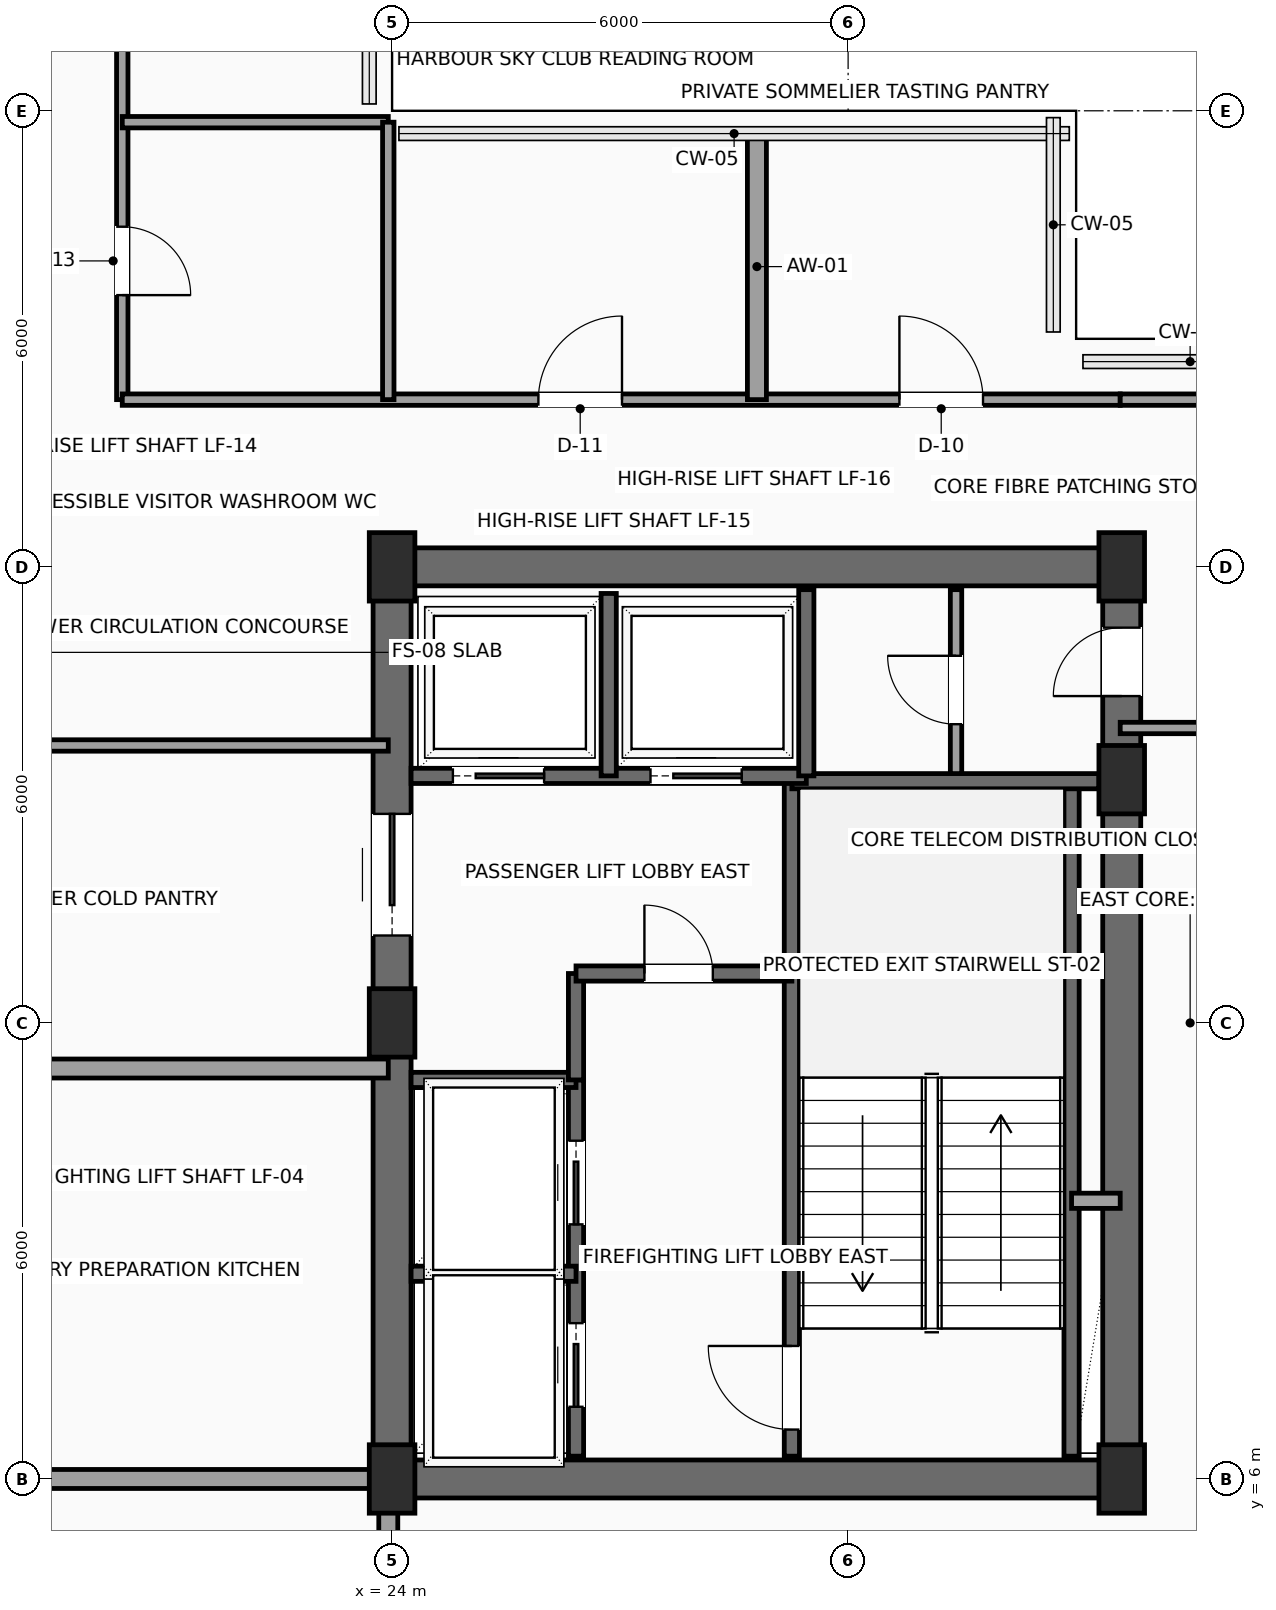
"""IFC4 building model, lengths in metres.
Left out: names, types, materials, properties, quantities, classifications, styles, units other than length and angle.
Written with IfcOpenShell. Run it as: python <this file> out.ifc"""

import sys

from ifc_helpers import new_model, si_unit, direction, frame, frame_2d, origin, origin_2d, place, context, subcontext, project, spatial, rectangle, extrude, element, fill, save


model = new_model("IFC4")
c1 = context("Model", 3, precision=1e-05, world=origin(), true_north=direction((0.0, 1.0)))
c2 = subcontext(c1, "Body", "Model", "MODEL_VIEW")
j1 = project(units=[si_unit("LENGTHUNIT", "METRE"), si_unit("PLANEANGLEUNIT", "RADIAN")], contexts=[c1])
p1 = place(None, origin())
s1 = spatial("IfcSite", under=j1, at=p1, CompositionType="ELEMENT")
p2 = place(p1, origin())
s2 = spatial("IfcBuilding", under=s1, at=p2, CompositionType="ELEMENT")
p3 = place(p2, frame((0.0, 0.0, 288.7)))
s3 = spatial("IfcBuildingStorey", under=s2, at=p3, CompositionType="ELEMENT", Elevation=288.7)
for number, where, z_axis, x_axis in (
    (1, (24.0, 6.0, 0.0), (0.0, 0.0, 1.0), (1.0, 0.0, 0.0)),
    (2, (24.0, 12.0, 0.0), (0.0, 0.0, 1.0), (1.0, 0.0, 0.0)),
    (3, (24.0, 18.0, 0.0), (0.0, 0.0, 1.0), (1.0, 0.0, 0.0)),
    (4, (33.6, 6.0, 0.0), (0.0, 0.0, 1.0), (1.0, 0.0, 0.0)),
    (5, (33.6, 15.2, 0.0), (0.0, 0.0, 1.0), (1.0, 0.0, 0.0)),
    (6, (33.6, 18.0, 0.0), (0.0, 0.0, 1.0), (1.0, 0.0, 0.0)),
):
    element("IfcColumn", number, at=place(p3, frame(where, z_axis=z_axis, x_axis=x_axis)), inside=s3, PredefinedType="COLUMN", context=c2, shape_type="SweptSolid", body=[
        extrude(rectangle(XDim=0.6, YDim=0.9, at=origin_2d()), origin(), (0.0, 0.0, 1.0), 3.5),
    ])
for number, where, z_axis, x_axis in (
    (7, (24.0, 6.0, 0.0), (0.0, 0.0, 1.0), (1.0, 0.0, 0.0)),
    (8, (24.0, 18.0, 0.0), (0.0, 0.0, 1.0), (1.0, 0.0, 0.0)),
):
    element("IfcWall", number, at=place(p3, frame(where, z_axis=z_axis, x_axis=x_axis)), inside=s3, PredefinedType="SHEAR", context=c2, shape_type="SweptSolid", body=[
        extrude(rectangle(XDim=9.6, YDim=0.5, at=frame_2d((4.8, 0.0))), origin(), (0.0, 0.0, 1.0), 3.3),
    ])
p4 = place(p3, frame((24.0, 6.0, 0.0), z_axis=(0.0, 0.0, 1.0), x_axis=(0.0, 1.0, 0.0)))
e9 = element("IfcWall", 9, at=p4, inside=s3, PredefinedType="SHEAR", context=c2, shape_type="SweptSolid", body=[
    extrude(rectangle(XDim=12.0, YDim=0.5, at=frame_2d((6.0, 0.0))), origin(), (0.0, 0.0, 1.0), 3.3),
])
p5 = place(p4, frame((7.15, 0.0, 0.0)))
e10 = element("IfcOpeningElement", 10, at=p5, cuts=e9, PredefinedType="OPENING", context=c2, shape_type="SweptSolid", body=[
    extrude(rectangle(XDim=1.6, YDim=2.3, at=frame_2d((0.8, 1.15))), frame((0.0, 0.26, 0.0), z_axis=(0.0, -1.0, 0.0), x_axis=(1.0, 0.0, 0.0)), (0.0, 0.0, 1.0), 0.52),
])
p6 = place(p3, frame((33.6, 6.0, 0.0), z_axis=(0.0, 0.0, 1.0), x_axis=(0.0, 1.0, 0.0)))
e11 = element("IfcWall", 11, at=p6, inside=s3, PredefinedType="SHEAR", context=c2, shape_type="SweptSolid", body=[
    extrude(rectangle(XDim=12.0, YDim=0.5, at=frame_2d((6.0, 0.0))), origin(), (0.0, 0.0, 1.0), 3.3),
])
p7 = place(p6, frame((10.3, 0.0, 0.0)))
e12 = element("IfcOpeningElement", 12, at=p7, cuts=e11, PredefinedType="OPENING", context=c2, shape_type="SweptSolid", body=[
    extrude(rectangle(XDim=0.9, YDim=2.15, at=frame_2d((0.45, 1.075))), frame((0.0, 0.26, 0.0), z_axis=(0.0, -1.0, 0.0), x_axis=(1.0, 0.0, 0.0)), (0.0, 0.0, 1.0), 0.52),
])
p8 = place(p3, frame((29.26, 6.3, 0.0), z_axis=(0.0, 0.0, 1.0), x_axis=(0.0, 1.0, 0.0)))
e13 = element("IfcWall", 13, at=p8, inside=s3, PredefinedType="SHEAR", context=c2, shape_type="SweptSolid", body=[
    extrude(rectangle(XDim=8.88, YDim=0.2, at=frame_2d((4.44, 0.0))), origin(), (0.0, 0.0, 1.0), 3.3),
])
p9 = place(p8, frame((0.35, 0.0, 0.0)))
e14 = element("IfcOpeningElement", 14, at=p9, cuts=e13, PredefinedType="OPENING", context=c2, shape_type="SweptSolid", body=[
    extrude(rectangle(XDim=1.1, YDim=2.2, at=frame_2d((0.55, 1.1))), frame((0.0, 0.11, 0.0), z_axis=(0.0, -1.0, 0.0), x_axis=(1.0, 0.0, 0.0)), (0.0, 0.0, 1.0), 0.22),
])
p10 = place(p3, frame((32.94, 6.3, 0.0), z_axis=(0.0, 0.0, 1.0), x_axis=(0.0, 1.0, 0.0)))
e15 = element("IfcWall", 15, at=p10, inside=s3, PredefinedType="SHEAR", context=c2, shape_type="SweptSolid", body=[
    extrude(rectangle(XDim=8.88, YDim=0.2, at=frame_2d((4.44, 0.0))), origin(), (0.0, 0.0, 1.0), 3.3),
])
p11 = place(p3, frame((29.26, 15.18, 0.0), z_axis=(0.0, 0.0, 1.0), x_axis=(1.0, 0.0, 0.0)))
e16 = element("IfcWall", 16, at=p11, inside=s3, PredefinedType="SHEAR", context=c2, shape_type="SweptSolid", body=[
    extrude(rectangle(XDim=4.04, YDim=0.2, at=frame_2d((2.02, 0.0))), origin(), (0.0, 0.0, 1.0), 3.3),
])
p12 = place(p3, frame((26.42, 6.3, 0.0), z_axis=(0.0, 0.0, 1.0), x_axis=(0.0, 1.0, 0.0)))
e17 = element("IfcWall", 17, at=p12, inside=s3, PredefinedType="SHEAR", context=c2, shape_type="SweptSolid", body=[
    extrude(rectangle(XDim=4.95, YDim=0.2, at=frame_2d((2.475, 0.0))), origin(), (0.0, 0.0, 1.0), 3.3),
])
p13 = place(p12, frame((0.65, 0.0, 0.0)))
e18 = element("IfcOpeningElement", 18, at=p13, cuts=e17, PredefinedType="OPENING", context=c2, shape_type="SweptSolid", body=[
    extrude(rectangle(XDim=1.1, YDim=2.2, at=frame_2d((0.55, 1.1))), frame((0.0, 0.11, 0.0), z_axis=(0.0, -1.0, 0.0), x_axis=(1.0, 0.0, 0.0)), (0.0, 0.0, 1.0), 0.22),
])
p14 = place(p12, frame((3.05, 0.0, 0.0)))
e19 = element("IfcOpeningElement", 19, at=p14, cuts=e17, PredefinedType="OPENING", context=c2, shape_type="SweptSolid", body=[
    extrude(rectangle(XDim=1.1, YDim=2.2, at=frame_2d((0.55, 1.1))), frame((0.0, 0.11, 0.0), z_axis=(0.0, -1.0, 0.0), x_axis=(1.0, 0.0, 0.0)), (0.0, 0.0, 1.0), 0.22),
])
for number, where, z_axis, x_axis in (
    (20, (24.25, 8.7, 0.0), (0.0, 0.0, 1.0), (1.0, 0.0, 0.0)),
    (21, (24.25, 11.25, 0.0), (0.0, 0.0, 1.0), (1.0, 0.0, 0.0)),
):
    element("IfcWall", number, at=place(p3, frame(where, z_axis=z_axis, x_axis=x_axis)), inside=s3, PredefinedType="SHEAR", context=c2, shape_type="SweptSolid", body=[
        extrude(rectangle(XDim=2.17, YDim=0.2, at=frame_2d((1.085, 0.0))), origin(), (0.0, 0.0, 1.0), 3.3),
    ])
p15 = place(p3, frame((26.42, 11.25, 0.0), z_axis=(0.0, 0.0, 1.0), x_axis=(0.0, 1.0, 0.0)))
e22 = element("IfcWall", 22, at=p15, inside=s3, PredefinedType="SHEAR", context=c2, shape_type="SweptSolid", body=[
    extrude(rectangle(XDim=1.4, YDim=0.2, at=frame_2d((0.7, 0.0))), origin(), (0.0, 0.0, 1.0), 3.3),
])
p16 = place(p3, frame((26.42, 12.65, 0.0), z_axis=(0.0, 0.0, 1.0), x_axis=(1.0, 0.0, 0.0)))
e23 = element("IfcWall", 23, at=p16, inside=s3, PredefinedType="SHEAR", context=c2, shape_type="SweptSolid", body=[
    extrude(rectangle(XDim=2.84, YDim=0.2, at=frame_2d((1.42, 0.0))), origin(), (0.0, 0.0, 1.0), 3.3),
])
p17 = place(p16, frame((0.9, 0.0, 0.0)))
e24 = element("IfcOpeningElement", 24, at=p17, cuts=e23, PredefinedType="OPENING", context=c2, shape_type="SweptSolid", body=[
    extrude(rectangle(XDim=0.9, YDim=2.15, at=frame_2d((0.45, 1.075))), frame((0.0, 0.11, 0.0), z_axis=(0.0, -1.0, 0.0), x_axis=(1.0, 0.0, 0.0)), (0.0, 0.0, 1.0), 0.22),
])
p18 = place(p3, frame((32.94, 9.66, 0.0), z_axis=(0.0, 0.0, 1.0), x_axis=(1.0, 0.0, 0.0)))
e25 = element("IfcWall", 25, at=p18, inside=s3, PredefinedType="SOLIDWALL", context=c2, shape_type="SweptSolid", body=[
    extrude(rectangle(XDim=0.64, YDim=0.2, at=frame_2d((0.32, 0.0))), origin(), (0.0, 0.0, 1.0), 3.3),
])
p19 = place(p3, frame((24.25, 15.25, 0.0), z_axis=(0.0, 0.0, 1.0), x_axis=(1.0, 0.0, 0.0)))
e26 = element("IfcWall", 26, at=p19, inside=s3, PredefinedType="SHEAR", context=c2, shape_type="SweptSolid", body=[
    extrude(rectangle(XDim=5.2, YDim=0.2, at=frame_2d((2.6, 0.0))), origin(), (0.0, 0.0, 1.0), 3.3),
])
p20 = place(p19, frame((0.55, 0.0, 0.0)))
e27 = element("IfcOpeningElement", 27, at=p20, cuts=e26, PredefinedType="OPENING", context=c2, shape_type="SweptSolid", body=[
    extrude(rectangle(XDim=1.2, YDim=2.2, at=frame_2d((0.6, 1.1))), frame((0.0, 0.11, 0.0), z_axis=(0.0, -1.0, 0.0), x_axis=(1.0, 0.0, 0.0)), (0.0, 0.0, 1.0), 0.22),
])
p21 = place(p19, frame((3.15, 0.0, 0.0)))
e28 = element("IfcOpeningElement", 28, at=p21, cuts=e26, PredefinedType="OPENING", context=c2, shape_type="SweptSolid", body=[
    extrude(rectangle(XDim=1.2, YDim=2.2, at=frame_2d((0.6, 1.1))), frame((0.0, 0.11, 0.0), z_axis=(0.0, -1.0, 0.0), x_axis=(1.0, 0.0, 0.0)), (0.0, 0.0, 1.0), 0.22),
])
p22 = place(p3, frame((26.85, 15.25, 0.0), z_axis=(0.0, 0.0, 1.0), x_axis=(0.0, 1.0, 0.0)))
e29 = element("IfcWall", 29, at=p22, inside=s3, PredefinedType="SHEAR", context=c2, shape_type="SweptSolid", body=[
    extrude(rectangle(XDim=2.4, YDim=0.2, at=frame_2d((1.2, 0.0))), origin(), (0.0, 0.0, 1.0), 3.3),
])
p23 = place(p3, frame((29.45, 15.25, 0.0), z_axis=(0.0, 0.0, 1.0), x_axis=(0.0, 1.0, 0.0)))
e30 = element("IfcWall", 30, at=p23, inside=s3, PredefinedType="SHEAR", context=c2, shape_type="SweptSolid", body=[
    extrude(rectangle(XDim=2.45, YDim=0.2, at=frame_2d((1.225, 0.0))), origin(), (0.0, 0.0, 1.0), 3.3),
])
p24 = place(p3, frame((31.42, 15.28, 0.0), z_axis=(0.0, 0.0, 1.0), x_axis=(0.0, 1.0, 0.0)))
e31 = element("IfcWall", 31, at=p24, inside=s3, PredefinedType="PARTITIONING", context=c2, shape_type="SweptSolid", body=[
    extrude(rectangle(XDim=2.42, YDim=0.15, at=frame_2d((1.21, 0.0))), origin(), (0.0, 0.0, 1.0), 3.3),
])
p25 = place(p24, frame((0.65, 0.0, 0.0)))
e32 = element("IfcOpeningElement", 32, at=p25, cuts=e31, PredefinedType="OPENING", context=c2, shape_type="SweptSolid", body=[
    extrude(rectangle(XDim=0.9, YDim=2.15, at=frame_2d((0.45, 1.075))), frame((0.0, 0.085, 0.0), z_axis=(0.0, -1.0, 0.0), x_axis=(1.0, 0.0, 0.0)), (0.0, 0.0, 1.0), 0.17),
])
p26 = place(p3, frame((20.45, 27.58, 0.0), z_axis=(0.0, 0.0, 1.0), x_axis=(0.0, -1.0, 0.0)))
e33 = element("IfcWall", 33, at=p26, inside=s3, PredefinedType="PARTITIONING", context=c2, shape_type="SweptSolid", body=[
    extrude(rectangle(XDim=7.38, YDim=0.15, at=frame_2d((3.69, 0.0))), origin(), (0.0, 0.0, 1.0), 3.3),
])
p27 = place(p26, frame((5.105, 0.0, 0.0)))
e34 = element("IfcOpeningElement", 34, at=p27, cuts=e33, PredefinedType="OPENING", context=c2, shape_type="SweptSolid", body=[
    extrude(rectangle(XDim=0.9, YDim=2.1, at=frame_2d((0.45, 1.05))), frame((0.0, 0.085, 0.0), z_axis=(0.0, -1.0, 0.0), x_axis=(1.0, 0.0, 0.0)), (0.0, 0.0, 1.0), 0.17),
])
p28 = place(p26, frame((1.405, 0.0, 0.0)))
e35 = element("IfcOpeningElement", 35, at=p28, cuts=e33, PredefinedType="OPENING", context=c2, shape_type="SweptSolid", body=[
    extrude(rectangle(XDim=0.95, YDim=2.15, at=frame_2d((0.475, 1.075))), frame((0.0, 0.085, 0.0), z_axis=(0.0, -1.0, 0.0), x_axis=(1.0, 0.0, 0.0)), (0.0, 0.0, 1.0), 0.17),
])
p29 = place(p3, frame((20.45, 20.2, 0.0), z_axis=(0.0, 0.0, 1.0), x_axis=(1.0, 0.0, 0.0)))
e36 = element("IfcWall", 36, at=p29, inside=s3, PredefinedType="PARTITIONING", context=c2, shape_type="SweptSolid", body=[
    extrude(rectangle(XDim=13.13, YDim=0.15, at=frame_2d((6.565, 0.0))), origin(), (0.0, 0.0, 1.0), 3.3),
])
p30 = place(p29, frame((5.475, 0.0, 0.0)))
e37 = element("IfcOpeningElement", 37, at=p30, cuts=e36, PredefinedType="OPENING", context=c2, shape_type="SweptSolid", body=[
    extrude(rectangle(XDim=1.1, YDim=2.25, at=frame_2d((0.55, 1.125))), frame((0.0, 0.085, 0.0), z_axis=(0.0, -1.0, 0.0), x_axis=(1.0, 0.0, 0.0)), (0.0, 0.0, 1.0), 0.17),
])
p31 = place(p29, frame((10.225, 0.0, 0.0)))
e38 = element("IfcOpeningElement", 38, at=p31, cuts=e36, PredefinedType="OPENING", context=c2, shape_type="SweptSolid", body=[
    extrude(rectangle(XDim=1.1, YDim=2.25, at=frame_2d((0.55, 1.125))), frame((0.0, 0.085, 0.0), z_axis=(0.0, -1.0, 0.0), x_axis=(1.0, 0.0, 0.0)), (0.0, 0.0, 1.0), 0.17),
])
for number, where, z_axis, x_axis in (
    (39, (33.58, 20.2, 0.0), (0.0, 0.0, 1.0), (1.0, 0.0, 0.0)),
    (40, (35.7, 15.88, 0.0), (0.0, 0.0, 1.0), (-1.0, 0.0, 0.0)),
):
    element("IfcWall", number, at=place(p3, frame(where, z_axis=z_axis, x_axis=x_axis)), inside=s3, PredefinedType="PARTITIONING", context=c2, shape_type="SweptSolid", body=[
        extrude(rectangle(XDim=2.12, YDim=0.15, at=frame_2d((1.06, 0.0))), origin(), (0.0, 0.0, 1.0), 3.3),
    ])
p32 = place(p3, frame((23.95, 15.65, 0.0), z_axis=(0.0, 0.0, 1.0), x_axis=(-1.0, 0.0, 0.0)))
e41 = element("IfcWall", 41, at=p32, inside=s3, PredefinedType="PARTITIONING", context=c2, shape_type="SweptSolid", body=[
    extrude(rectangle(XDim=9.0, YDim=0.15, at=frame_2d((4.5, 0.0))), origin(), (0.0, 0.0, 1.0), 3.3),
])
p33 = place(p3, frame((20.45, 23.85, 0.0), z_axis=(0.0, 0.0, 1.0), x_axis=(1.0, 0.0, 0.0)))
e42 = element("IfcWall", 42, at=p33, inside=s3, PredefinedType="PARTITIONING", context=c2, shape_type="SweptSolid", body=[
    extrude(rectangle(XDim=3.5, YDim=0.15, at=frame_2d((1.75, 0.0))), origin(), (0.0, 0.0, 1.0), 3.3),
])
p34 = place(p3, frame((23.95, 20.2, 0.0), z_axis=(0.0, 0.0, 1.0), x_axis=(0.0, 1.0, 0.0)))
e43 = element("IfcWall", 43, at=p34, inside=s3, PredefinedType="PARTITIONING", context=c2, shape_type="SweptSolid", body=[
    extrude(rectangle(XDim=3.65, YDim=0.15, at=frame_2d((1.825, 0.0))), origin(), (0.0, 0.0, 1.0), 3.3),
])
p35 = place(p3, frame((28.8, 20.2, 0.0), z_axis=(0.0, 0.0, 1.0), x_axis=(0.0, 1.0, 0.0)))
e44 = element("IfcWall", 44, at=p35, inside=s3, PredefinedType="PARTITIONING", context=c2, shape_type="SweptSolid", body=[
    extrude(rectangle(XDim=3.5, YDim=0.25, at=frame_2d((1.75, 0.0))), origin(), (0.0, 0.0, 1.0), 3.3),
])
p36 = place(p3, frame((14.95, 6.0, 0.0), z_axis=(0.0, 0.0, 1.0), x_axis=(1.0, 0.0, 0.0)))
e45 = element("IfcWall", 45, at=p36, inside=s3, PredefinedType="PARTITIONING", context=c2, shape_type="SweptSolid", body=[
    extrude(rectangle(XDim=9.0, YDim=0.25, at=frame_2d((4.5, 0.0))), origin(), (0.0, 0.0, 1.0), 2.992),
])
p37 = place(p3, frame((23.95, 0.3, 0.0), z_axis=(0.0, 0.0, 1.0), x_axis=(0.0, 1.0, 0.0)))
e46 = element("IfcWall", 46, at=p37, inside=s3, PredefinedType="PARTITIONING", context=c2, shape_type="SweptSolid", body=[
    extrude(rectangle(XDim=5.7, YDim=0.25, at=frame_2d((2.85, 0.0))), origin(), (0.0, 0.0, 1.0), 2.992),
])
p38 = place(p3, frame((14.95, 11.4, 0.0), z_axis=(0.0, 0.0, 1.0), x_axis=(1.0, 0.0, 0.0)))
e47 = element("IfcWall", 47, at=p38, inside=s3, PredefinedType="PARTITIONING", context=c2, shape_type="SweptSolid", body=[
    extrude(rectangle(XDim=9.0, YDim=0.25, at=frame_2d((4.5, 0.0))), origin(), (0.0, 0.0, 1.0), 3.3),
])
p39 = place(p5, origin())
e48 = element("IfcDoor", 48, at=p39, inside=s3, OperationType="DOUBLE_DOOR_SLIDING", PredefinedType="DOOR", context=c2, shape_type="SweptSolid", body=[
    extrude(rectangle(XDim=1.6, YDim=2.3, at=frame_2d((0.8, 1.15))), frame((0.0, 0.025, 0.0), z_axis=(0.0, -1.0, 0.0), x_axis=(1.0, 0.0, 0.0)), (0.0, 0.0, 1.0), 0.05),
])
fill(e10, e48)
p40 = place(p7, origin())
e49 = element("IfcDoor", 49, at=p40, inside=s3, OperationType="SINGLE_SWING_LEFT", PredefinedType="DOOR", context=c2, shape_type="SweptSolid", body=[
    extrude(rectangle(XDim=0.9, YDim=2.15, at=frame_2d((0.45, 1.075))), frame((0.0, 0.025, 0.0), z_axis=(0.0, -1.0, 0.0), x_axis=(1.0, 0.0, 0.0)), (0.0, 0.0, 1.0), 0.05),
])
fill(e12, e49)
p41 = place(p9, origin())
e50 = element("IfcDoor", 50, at=p41, inside=s3, OperationType="SINGLE_SWING_RIGHT", PredefinedType="DOOR", context=c2, shape_type="SweptSolid", body=[
    extrude(rectangle(XDim=1.1, YDim=2.2, at=frame_2d((0.55, 1.1))), frame((0.0, 0.025, 0.0), z_axis=(0.0, -1.0, 0.0), x_axis=(1.0, 0.0, 0.0)), (0.0, 0.0, 1.0), 0.05),
])
fill(e14, e50)
p42 = place(p13, origin())
e51 = element("IfcDoor", 51, at=p42, inside=s3, OperationType="SLIDING_TO_LEFT", PredefinedType="DOOR", context=c2, shape_type="SweptSolid", body=[
    extrude(rectangle(XDim=1.1, YDim=2.2, at=frame_2d((0.55, 1.1))), frame((0.0, 0.025, 0.0), z_axis=(0.0, -1.0, 0.0), x_axis=(1.0, 0.0, 0.0)), (0.0, 0.0, 1.0), 0.05),
])
fill(e18, e51)
p43 = place(p14, origin())
e52 = element("IfcDoor", 52, at=p43, inside=s3, OperationType="SLIDING_TO_LEFT", PredefinedType="DOOR", context=c2, shape_type="SweptSolid", body=[
    extrude(rectangle(XDim=1.1, YDim=2.2, at=frame_2d((0.55, 1.1))), frame((0.0, 0.025, 0.0), z_axis=(0.0, -1.0, 0.0), x_axis=(1.0, 0.0, 0.0)), (0.0, 0.0, 1.0), 0.05),
])
fill(e19, e52)
p44 = place(p17, origin())
e53 = element("IfcDoor", 53, at=p44, inside=s3, OperationType="SINGLE_SWING_LEFT", PredefinedType="DOOR", context=c2, shape_type="SweptSolid", body=[
    extrude(rectangle(XDim=0.9, YDim=2.15, at=frame_2d((0.45, 1.075))), frame((0.0, 0.025, 0.0), z_axis=(0.0, -1.0, 0.0), x_axis=(1.0, 0.0, 0.0)), (0.0, 0.0, 1.0), 0.05),
])
fill(e24, e53)
p45 = place(p20, origin())
e54 = element("IfcDoor", 54, at=p45, inside=s3, OperationType="SLIDING_TO_RIGHT", PredefinedType="DOOR", context=c2, shape_type="SweptSolid", body=[
    extrude(rectangle(XDim=1.2, YDim=2.2, at=frame_2d((0.6, 1.1))), frame((0.0, 0.025, 0.0), z_axis=(0.0, -1.0, 0.0), x_axis=(1.0, 0.0, 0.0)), (0.0, 0.0, 1.0), 0.05),
])
fill(e27, e54)
p46 = place(p21, origin())
e55 = element("IfcDoor", 55, at=p46, inside=s3, OperationType="SLIDING_TO_RIGHT", PredefinedType="DOOR", context=c2, shape_type="SweptSolid", body=[
    extrude(rectangle(XDim=1.2, YDim=2.2, at=frame_2d((0.6, 1.1))), frame((0.0, 0.025, 0.0), z_axis=(0.0, -1.0, 0.0), x_axis=(1.0, 0.0, 0.0)), (0.0, 0.0, 1.0), 0.05),
])
fill(e28, e55)
p47 = place(p25, origin())
e56 = element("IfcDoor", 56, at=p47, inside=s3, OperationType="SINGLE_SWING_RIGHT", PredefinedType="DOOR", context=c2, shape_type="SweptSolid", body=[
    extrude(rectangle(XDim=0.9, YDim=2.15, at=frame_2d((0.45, 1.075))), frame((0.0, 0.025, 0.0), z_axis=(0.0, -1.0, 0.0), x_axis=(1.0, 0.0, 0.0)), (0.0, 0.0, 1.0), 0.05),
])
fill(e32, e56)
p48 = place(p27, origin())
e57 = element("IfcDoor", 57, at=p48, inside=s3, OperationType="SINGLE_SWING_RIGHT", PredefinedType="DOOR", context=c2, shape_type="SweptSolid", body=[
    extrude(rectangle(XDim=0.9, YDim=2.1, at=frame_2d((0.45, 1.05))), frame((0.0, 0.025, 0.0), z_axis=(0.0, -1.0, 0.0), x_axis=(1.0, 0.0, 0.0)), (0.0, 0.0, 1.0), 0.05),
])
fill(e34, e57)
p49 = place(p30, origin())
e58 = element("IfcDoor", 58, at=p49, inside=s3, OperationType="SINGLE_SWING_RIGHT", PredefinedType="DOOR", context=c2, shape_type="SweptSolid", body=[
    extrude(rectangle(XDim=1.1, YDim=2.25, at=frame_2d((0.55, 1.125))), frame((0.0, 0.025, 0.0), z_axis=(0.0, -1.0, 0.0), x_axis=(1.0, 0.0, 0.0)), (0.0, 0.0, 1.0), 0.05),
])
fill(e37, e58)
p50 = place(p31, origin())
e59 = element("IfcDoor", 59, at=p50, inside=s3, OperationType="SINGLE_SWING_LEFT", PredefinedType="DOOR", context=c2, shape_type="SweptSolid", body=[
    extrude(rectangle(XDim=1.1, YDim=2.25, at=frame_2d((0.55, 1.125))), frame((0.0, 0.025, 0.0), z_axis=(0.0, -1.0, 0.0), x_axis=(1.0, 0.0, 0.0)), (0.0, 0.0, 1.0), 0.05),
])
fill(e38, e59)
save(model, sys.argv[1])
